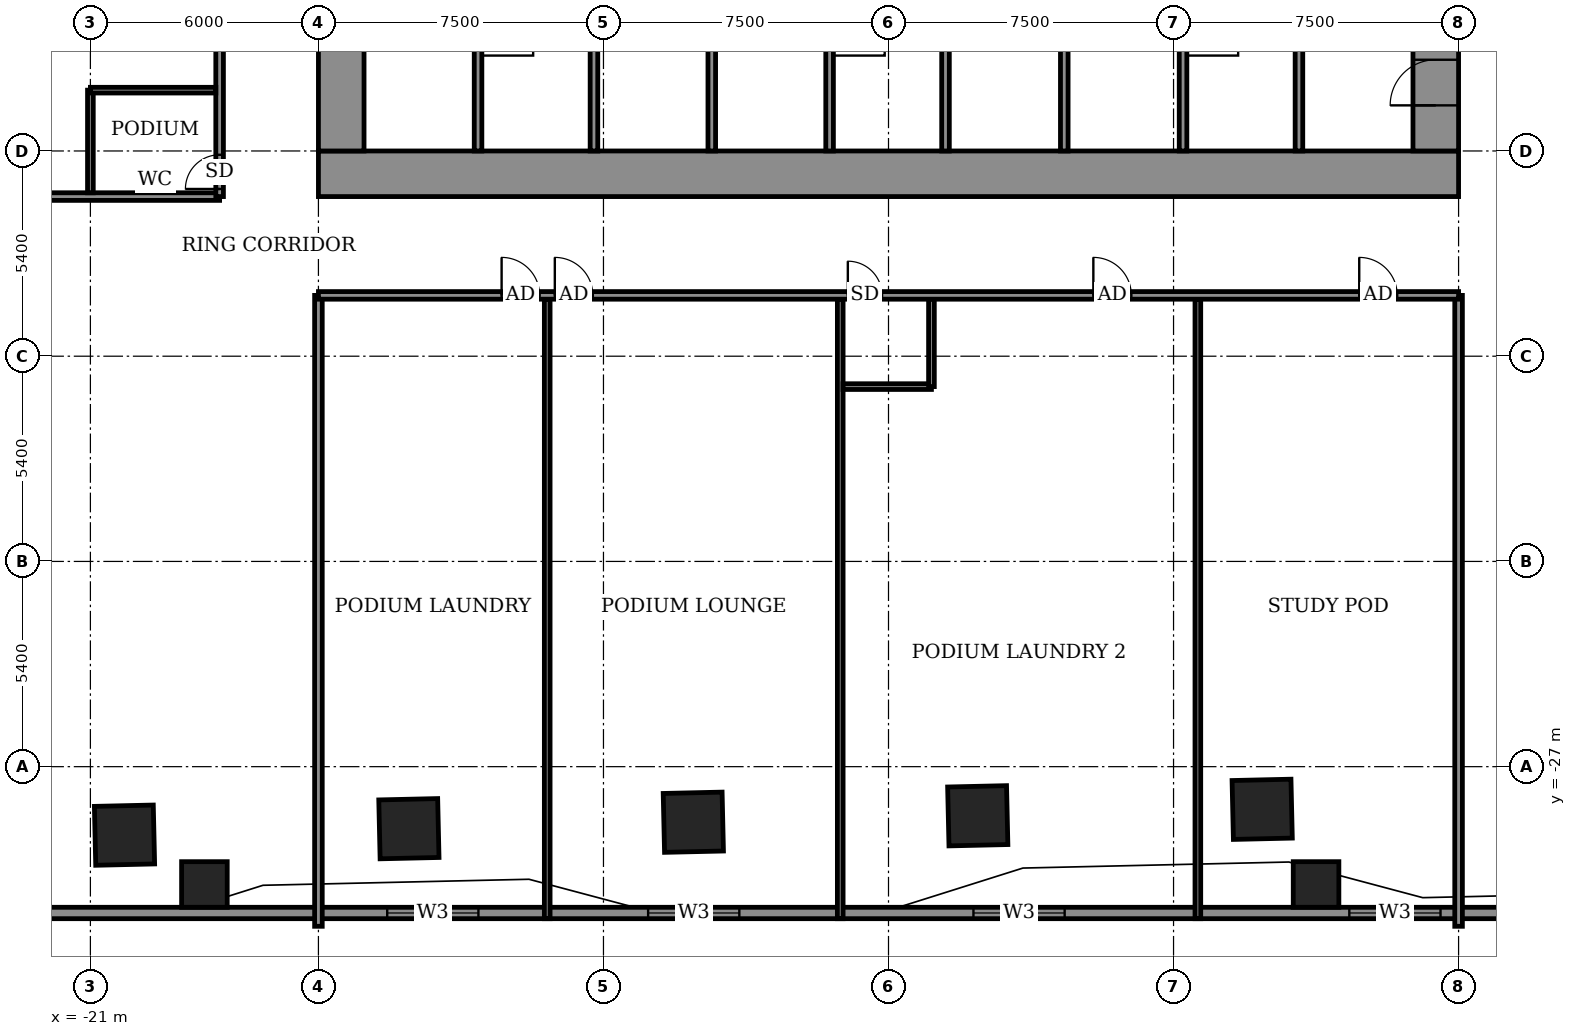
"""IFC4 building model, lengths in metres.
Left out: names, types, materials, properties, quantities, classifications, styles, units other than length and angle.
Written with IfcOpenShell. Run it as: python <this file> out.ifc"""

import sys

from ifc_helpers import new_model, si_unit, direction, frame, frame_2d, origin, origin_2d, place, context, subcontext, project, spatial, rectangle, extrude, element, fill, save


model = new_model("IFC4")
c1 = context("Model", 3, precision=1e-05, world=origin(), true_north=direction((0.0, 1.0)))
c2 = subcontext(c1, "Body", "Model", "MODEL_VIEW")
j1 = project(units=[si_unit("LENGTHUNIT", "METRE"), si_unit("PLANEANGLEUNIT", "RADIAN")], contexts=[c1])
p1 = place(None, origin())
s1 = spatial("IfcSite", under=j1, at=p1, CompositionType="ELEMENT")
p2 = place(p1, origin())
s2 = spatial("IfcBuilding", under=s1, at=p2, CompositionType="ELEMENT")
p3 = place(p2, frame((0.0, 0.0, 25.0)))
s3 = spatial("IfcBuildingStorey", under=s2, at=p3, CompositionType="ELEMENT", Elevation=25.0)
for number, where, z_axis, x_axis in (
    (1, (-20.103, -28.802, -0.55), (0.0, 0.0, 1.0), (1.0, 0.023, 0.0)),
    (2, (-12.62, -28.632, -0.55), (0.0, 0.0, 1.0), (1.0, 0.023, 0.0)),
    (3, (-5.135, -28.462, -0.55), (0.0, 0.0, 1.0), (1.0, 0.023, 0.0)),
    (4, (2.348, -28.292, -0.55), (0.0, 0.0, 1.0), (1.0, 0.023, 0.0)),
    (5, (9.833, -28.122, -0.55), (0.0, 0.0, 1.0), (1.0, 0.023, 0.0)),
):
    element("IfcColumn", number, at=place(p3, frame(where, z_axis=z_axis, x_axis=x_axis)), inside=s3, PredefinedType="COLUMN", context=c2, shape_type="SweptSolid", body=[
        extrude(rectangle(XDim=1.55, YDim=1.55, at=origin_2d()), origin(), (0.0, 0.0, 1.0), 4.5),
    ])
for number, where, z_axis, x_axis in (
    (6, (-18.0, -30.1, -0.55), (0.0, 0.0, 1.0), (1.0, 0.0, 0.0)),
    (7, (11.25, -30.1, -0.55), (0.0, 0.0, 1.0), (1.0, 0.0, 0.0)),
):
    element("IfcColumn", number, at=place(p3, frame(where, z_axis=z_axis, x_axis=x_axis)), inside=s3, PredefinedType="COLUMN", context=c2, shape_type="SweptSolid", body=[
        extrude(rectangle(XDim=1.2, YDim=1.2, at=origin_2d()), origin(), (0.0, 0.0, 1.0), 4.5),
    ])
p4 = place(p3, frame((-28.138, -30.85, 0.0), z_axis=(0.0, 0.0, 1.0), x_axis=(1.0, 0.0, 0.0)))
e8 = element("IfcWall", 8, at=p4, inside=s3, PredefinedType="SOLIDWALL", context=c2, shape_type="SweptSolid", body=[
    extrude(rectangle(XDim=56.276, YDim=0.3, at=frame_2d((28.138, 0.0))), origin(), (0.0, 0.0, 1.0), 3.95),
])
p5 = place(p4, frame((14.948, 0.0, 0.9)))
e9 = element("IfcOpeningElement", 9, at=p5, cuts=e8, PredefinedType="OPENING", context=c2, shape_type="SweptSolid", body=[
    extrude(rectangle(XDim=2.4, YDim=1.8, at=frame_2d((1.2, 0.9))), frame((0.0, 0.16, 0.0), z_axis=(0.0, -1.0, 0.0), x_axis=(1.0, 0.0, 0.0)), (0.0, 0.0, 1.0), 0.32),
])
p6 = place(p4, frame((21.813, 0.0, 0.9)))
e10 = element("IfcOpeningElement", 10, at=p6, cuts=e8, PredefinedType="OPENING", context=c2, shape_type="SweptSolid", body=[
    extrude(rectangle(XDim=2.4, YDim=1.8, at=frame_2d((1.2, 0.9))), frame((0.0, 0.16, 0.0), z_axis=(0.0, -1.0, 0.0), x_axis=(1.0, 0.0, 0.0)), (0.0, 0.0, 1.0), 0.32),
])
p7 = place(p4, frame((30.373, 0.0, 0.9)))
e11 = element("IfcOpeningElement", 11, at=p7, cuts=e8, PredefinedType="OPENING", context=c2, shape_type="SweptSolid", body=[
    extrude(rectangle(XDim=2.4, YDim=1.8, at=frame_2d((1.2, 0.9))), frame((0.0, 0.16, 0.0), z_axis=(0.0, -1.0, 0.0), x_axis=(1.0, 0.0, 0.0)), (0.0, 0.0, 1.0), 0.32),
])
p8 = place(p4, frame((40.263, 0.0, 0.9)))
e12 = element("IfcOpeningElement", 12, at=p8, cuts=e8, PredefinedType="OPENING", context=c2, shape_type="SweptSolid", body=[
    extrude(rectangle(XDim=2.4, YDim=1.8, at=frame_2d((1.2, 0.9))), frame((0.0, 0.16, 0.0), z_axis=(0.0, -1.0, 0.0), x_axis=(1.0, 0.0, 0.0)), (0.0, 0.0, 1.0), 0.32),
])
p9 = place(p4, frame((53.553, 0.0, 0.9)))
e13 = element("IfcOpeningElement", 13, at=p9, cuts=e8, PredefinedType="OPENING", context=c2, shape_type="SweptSolid", body=[
    extrude(rectangle(XDim=2.4, YDim=1.8, at=frame_2d((1.2, 0.9))), frame((0.0, 0.16, 0.0), z_axis=(0.0, -1.0, 0.0), x_axis=(1.0, 0.0, 0.0)), (0.0, 0.0, 1.0), 0.32),
])
p10 = place(p3, frame((-15.0, -31.2, 0.0), z_axis=(0.0, 0.0, 1.0), x_axis=(0.0, 1.0, 0.0)))
e14 = element("IfcWall", 14, at=p10, inside=s3, PredefinedType="PARTITIONING", context=c2, shape_type="SweptSolid", body=[
    extrude(rectangle(XDim=16.6, YDim=0.2, at=frame_2d((8.3, 0.0))), origin(), (0.0, 0.0, 1.0), 3.95),
])
for number, where, z_axis, x_axis in (
    (15, (-8.98, -31.0, 0.0), (0.0, 0.0, 1.0), (0.0, 1.0, 0.0)),
    (16, (-1.27, -31.0, 0.0), (0.0, 0.0, 1.0), (0.0, 1.0, 0.0)),
    (17, (8.14, -31.0, 0.0), (0.0, 0.0, 1.0), (0.0, 1.0, 0.0)),
):
    element("IfcWall", number, at=place(p3, frame(where, z_axis=z_axis, x_axis=x_axis)), inside=s3, PredefinedType="PARTITIONING", context=c2, shape_type="SweptSolid", body=[
        extrude(rectangle(XDim=16.3, YDim=0.15, at=frame_2d((8.15, 0.0))), origin(), (0.0, 0.0, 1.0), 3.95),
    ])
p11 = place(p3, frame((15.0, -31.2, 0.0), z_axis=(0.0, 0.0, 1.0), x_axis=(0.0, 1.0, 0.0)))
e18 = element("IfcWall", 18, at=p11, inside=s3, PredefinedType="PARTITIONING", context=c2, shape_type="SweptSolid", body=[
    extrude(rectangle(XDim=16.6, YDim=0.2, at=frame_2d((8.3, 0.0))), origin(), (0.0, 0.0, 1.0), 3.95),
])
p12 = place(p3, frame((-1.195, -17.0, 0.0), z_axis=(0.0, 0.0, 1.0), x_axis=(1.0, 0.0, 0.0)))
e19 = element("IfcWall", 19, at=p12, inside=s3, PredefinedType="PARTITIONING", context=c2, shape_type="SweptSolid", body=[
    extrude(rectangle(XDim=2.325, YDim=0.15, at=frame_2d((1.163, 0.0))), origin(), (0.0, 0.0, 1.0), 3.95),
])
p13 = place(p3, frame((1.13, -17.0, 0.0), z_axis=(0.0, 0.0, 1.0), x_axis=(0.0, 1.0, 0.0)))
e20 = element("IfcWall", 20, at=p13, inside=s3, PredefinedType="PARTITIONING", context=c2, shape_type="SweptSolid", body=[
    extrude(rectangle(XDim=2.3, YDim=0.15, at=frame_2d((1.15, 0.0))), origin(), (0.0, 0.0, 1.0), 3.95),
])
p14 = place(p3, frame((-15.0, -14.6, 0.0), z_axis=(0.0, 0.0, 1.0), x_axis=(1.0, 0.0, 0.0)))
e21 = element("IfcWall", 21, at=p14, inside=s3, PredefinedType="PARTITIONING", context=c2, shape_type="SweptSolid", body=[
    extrude(rectangle(XDim=30.0, YDim=0.2, at=frame_2d((15.0, 0.0))), origin(), (0.0, 0.0, 1.0), 3.95),
])
p15 = place(p14, frame((4.82, 0.0, 0.0)))
e22 = element("IfcOpeningElement", 22, at=p15, cuts=e21, PredefinedType="OPENING", context=c2, shape_type="SweptSolid", body=[
    extrude(rectangle(XDim=1.0, YDim=2.1, at=frame_2d((0.5, 1.05))), frame((0.0, 0.11, 0.0), z_axis=(0.0, -1.0, 0.0), x_axis=(1.0, 0.0, 0.0)), (0.0, 0.0, 1.0), 0.22),
])
p16 = place(p14, frame((6.22, 0.0, 0.0)))
e23 = element("IfcOpeningElement", 23, at=p16, cuts=e21, PredefinedType="OPENING", context=c2, shape_type="SweptSolid", body=[
    extrude(rectangle(XDim=1.0, YDim=2.1, at=frame_2d((0.5, 1.05))), frame((0.0, 0.11, 0.0), z_axis=(0.0, -1.0, 0.0), x_axis=(1.0, 0.0, 0.0)), (0.0, 0.0, 1.0), 0.22),
])
p17 = place(p14, frame((20.39, 0.0, 0.0)))
e24 = element("IfcOpeningElement", 24, at=p17, cuts=e21, PredefinedType="OPENING", context=c2, shape_type="SweptSolid", body=[
    extrude(rectangle(XDim=1.0, YDim=2.1, at=frame_2d((0.5, 1.05))), frame((0.0, 0.11, 0.0), z_axis=(0.0, -1.0, 0.0), x_axis=(1.0, 0.0, 0.0)), (0.0, 0.0, 1.0), 0.22),
])
p18 = place(p14, frame((13.93, 0.0, 0.0)))
e25 = element("IfcOpeningElement", 25, at=p18, cuts=e21, PredefinedType="OPENING", context=c2, shape_type="SweptSolid", body=[
    extrude(rectangle(XDim=0.9, YDim=2.1, at=frame_2d((0.45, 1.05))), frame((0.0, 0.11, 0.0), z_axis=(0.0, -1.0, 0.0), x_axis=(1.0, 0.0, 0.0)), (0.0, 0.0, 1.0), 0.22),
])
p19 = place(p14, frame((27.386, 0.0, 0.0)))
e26 = element("IfcOpeningElement", 26, at=p19, cuts=e21, PredefinedType="OPENING", context=c2, shape_type="SweptSolid", body=[
    extrude(rectangle(XDim=1.0, YDim=2.1, at=frame_2d((0.5, 1.05))), frame((0.0, 0.11, 0.0), z_axis=(0.0, -1.0, 0.0), x_axis=(1.0, 0.0, 0.0)), (0.0, 0.0, 1.0), 0.22),
])
p20 = place(p3, frame((-34.3, -12.0, 0.0), z_axis=(0.0, 0.0, 1.0), x_axis=(1.0, 0.0, 0.0)))
e27 = element("IfcWall", 27, at=p20, inside=s3, PredefinedType="PARTITIONING", context=c2, shape_type="SweptSolid", body=[
    extrude(rectangle(XDim=16.7, YDim=0.2, at=frame_2d((8.35, 0.0))), origin(), (0.0, 0.0, 1.0), 3.95),
])
p21 = place(p3, frame((-21.0, -11.9, 0.0), z_axis=(0.0, 0.0, 1.0), x_axis=(0.0, 1.0, 0.0)))
e28 = element("IfcWall", 28, at=p21, inside=s3, PredefinedType="PARTITIONING", context=c2, shape_type="SweptSolid", body=[
    extrude(rectangle(XDim=2.7, YDim=0.15, at=frame_2d((1.35, 0.0))), origin(), (0.0, 0.0, 1.0), 3.95),
])
p22 = place(p3, frame((-17.6, -12.0, 0.0), z_axis=(0.0, 0.0, 1.0), x_axis=(0.0, 1.0, 0.0)))
e29 = element("IfcWall", 29, at=p22, inside=s3, PredefinedType="PARTITIONING", context=c2, shape_type="SweptSolid", body=[
    extrude(rectangle(XDim=24.0, YDim=0.2, at=frame_2d((12.0, 0.0))), origin(), (0.0, 0.0, 1.0), 3.95),
])
p23 = place(p22, frame((9.58, 0.0, 0.0)))
e30 = element("IfcOpeningElement", 30, at=p23, cuts=e29, PredefinedType="OPENING", context=c2, shape_type="SweptSolid", body=[
    extrude(rectangle(XDim=1.0, YDim=2.1, at=frame_2d((0.5, 1.05))), frame((0.0, 0.11, 0.0), z_axis=(0.0, -1.0, 0.0), x_axis=(1.0, 0.0, 0.0)), (0.0, 0.0, 1.0), 0.22),
])
p24 = place(p22, frame((0.2, 0.0, 0.0)))
e31 = element("IfcOpeningElement", 31, at=p24, cuts=e29, PredefinedType="OPENING", context=c2, shape_type="SweptSolid", body=[
    extrude(rectangle(XDim=0.9, YDim=2.1, at=frame_2d((0.45, 1.05))), frame((0.0, 0.11, 0.0), z_axis=(0.0, -1.0, 0.0), x_axis=(1.0, 0.0, 0.0)), (0.0, 0.0, 1.0), 0.22),
])
p25 = place(p3, frame((-21.0, -9.2, 0.0), z_axis=(0.0, 0.0, 1.0), x_axis=(1.0, 0.0, 0.0)))
e32 = element("IfcWall", 32, at=p25, inside=s3, PredefinedType="PARTITIONING", context=c2, shape_type="SweptSolid", body=[
    extrude(rectangle(XDim=3.3, YDim=0.15, at=frame_2d((1.65, 0.0))), origin(), (0.0, 0.0, 1.0), 3.95),
])
p26 = place(p3, frame((-15.0, -11.4, 0.0), z_axis=(0.0, 0.0, 1.0), x_axis=(1.0, 0.0, 0.0)))
e33 = element("IfcWall", 33, at=p26, inside=s3, PredefinedType="SHEAR", context=c2, shape_type="SweptSolid", body=[
    extrude(rectangle(XDim=30.0, YDim=1.2, at=frame_2d((15.0, 0.0))), origin(), (0.0, 0.0, 1.0), 4.5),
])
p27 = place(p3, frame((-14.4, -10.8, 0.0), z_axis=(0.0, 0.0, 1.0), x_axis=(0.0, 1.0, 0.0)))
e34 = element("IfcWall", 34, at=p27, inside=s3, PredefinedType="SHEAR", context=c2, shape_type="SweptSolid", body=[
    extrude(rectangle(XDim=21.6, YDim=1.2, at=frame_2d((10.8, 0.0))), origin(), (0.0, 0.0, 1.0), 4.5),
])
p28 = place(p27, frame((8.25, 0.0, 0.0)))
e35 = element("IfcOpeningElement", 35, at=p28, cuts=e34, PredefinedType="OPENING", context=c2, shape_type="SweptSolid", body=[
    extrude(rectangle(XDim=1.2, YDim=2.1, at=frame_2d((0.6, 1.05))), frame((0.0, 0.61, 0.0), z_axis=(0.0, -1.0, 0.0), x_axis=(1.0, 0.0, 0.0)), (0.0, 0.0, 1.0), 1.22),
])
p29 = place(p27, frame((15.25, 0.0, 0.0)))
e36 = element("IfcOpeningElement", 36, at=p29, cuts=e34, PredefinedType="OPENING", context=c2, shape_type="SweptSolid", body=[
    extrude(rectangle(XDim=1.2, YDim=2.1, at=frame_2d((0.6, 1.05))), frame((0.0, 0.61, 0.0), z_axis=(0.0, -1.0, 0.0), x_axis=(1.0, 0.0, 0.0)), (0.0, 0.0, 1.0), 1.22),
])
p30 = place(p3, frame((14.4, -10.8, 0.0), z_axis=(0.0, 0.0, 1.0), x_axis=(0.0, 1.0, 0.0)))
e37 = element("IfcWall", 37, at=p30, inside=s3, PredefinedType="SHEAR", context=c2, shape_type="SweptSolid", body=[
    extrude(rectangle(XDim=21.6, YDim=1.2, at=frame_2d((10.8, 0.0))), origin(), (0.0, 0.0, 1.0), 4.5),
])
p31 = place(p30, frame((1.2, 0.0, 0.0)))
e38 = element("IfcOpeningElement", 38, at=p31, cuts=e37, PredefinedType="OPENING", context=c2, shape_type="SweptSolid", body=[
    extrude(rectangle(XDim=1.2, YDim=2.1, at=frame_2d((0.6, 1.05))), frame((0.0, 0.61, 0.0), z_axis=(0.0, -1.0, 0.0), x_axis=(1.0, 0.0, 0.0)), (0.0, 0.0, 1.0), 1.22),
])
for number, where, z_axis, x_axis in (
    (39, (-10.8, -10.8, 0.0), (0.0, 0.0, 1.0), (0.0, 1.0, 0.0)),
    (40, (-7.75, -10.8, 0.0), (0.0, 0.0, 1.0), (0.0, 1.0, 0.0)),
):
    element("IfcWall", number, at=place(p3, frame(where, z_axis=z_axis, x_axis=x_axis)), inside=s3, PredefinedType="SHEAR", context=c2, shape_type="SweptSolid", body=[
        extrude(rectangle(XDim=7.5, YDim=0.2, at=frame_2d((3.75, 0.0))), origin(), (0.0, 0.0, 1.0), 3.95),
    ])
p32 = place(p3, frame((-1.55, -10.8, 0.0), z_axis=(0.0, 0.0, 1.0), x_axis=(0.0, 1.0, 0.0)))
e41 = element("IfcWall", 41, at=p32, inside=s3, PredefinedType="SHEAR", context=c2, shape_type="SweptSolid", body=[
    extrude(rectangle(XDim=7.5, YDim=0.2, at=frame_2d((3.75, 0.0))), origin(), (0.0, 0.0, 1.0), 3.95),
])
p33 = place(p32, frame((6.3, 0.0, 0.0)))
e42 = element("IfcOpeningElement", 42, at=p33, cuts=e41, PredefinedType="OPENING", context=c2, shape_type="SweptSolid", body=[
    extrude(rectangle(XDim=1.0, YDim=2.1, at=frame_2d((0.5, 1.05))), frame((0.0, 0.11, 0.0), z_axis=(0.0, -1.0, 0.0), x_axis=(1.0, 0.0, 0.0)), (0.0, 0.0, 1.0), 0.22),
])
p34 = place(p3, frame((1.5, -10.8, 0.0), z_axis=(0.0, 0.0, 1.0), x_axis=(0.0, 1.0, 0.0)))
e43 = element("IfcWall", 43, at=p34, inside=s3, PredefinedType="SHEAR", context=c2, shape_type="SweptSolid", body=[
    extrude(rectangle(XDim=7.5, YDim=0.2, at=frame_2d((3.75, 0.0))), origin(), (0.0, 0.0, 1.0), 3.95),
])
p35 = place(p34, frame((6.3, 0.0, 0.0)))
e44 = element("IfcOpeningElement", 44, at=p35, cuts=e43, PredefinedType="OPENING", context=c2, shape_type="SweptSolid", body=[
    extrude(rectangle(XDim=1.0, YDim=2.1, at=frame_2d((0.5, 1.05))), frame((0.0, 0.11, 0.0), z_axis=(0.0, -1.0, 0.0), x_axis=(1.0, 0.0, 0.0)), (0.0, 0.0, 1.0), 0.22),
])
p36 = place(p3, frame((7.75, -10.8, 0.0), z_axis=(0.0, 0.0, 1.0), x_axis=(0.0, 1.0, 0.0)))
e45 = element("IfcWall", 45, at=p36, inside=s3, PredefinedType="SHEAR", context=c2, shape_type="SweptSolid", body=[
    extrude(rectangle(XDim=7.5, YDim=0.2, at=frame_2d((3.75, 0.0))), origin(), (0.0, 0.0, 1.0), 3.95),
])
p37 = place(p36, frame((6.3, 0.0, 0.0)))
e46 = element("IfcOpeningElement", 46, at=p37, cuts=e45, PredefinedType="OPENING", context=c2, shape_type="SweptSolid", body=[
    extrude(rectangle(XDim=1.0, YDim=2.1, at=frame_2d((0.5, 1.05))), frame((0.0, 0.11, 0.0), z_axis=(0.0, -1.0, 0.0), x_axis=(1.0, 0.0, 0.0)), (0.0, 0.0, 1.0), 0.22),
])
p38 = place(p3, frame((10.8, -10.8, 0.0), z_axis=(0.0, 0.0, 1.0), x_axis=(0.0, 1.0, 0.0)))
e47 = element("IfcWall", 47, at=p38, inside=s3, PredefinedType="SHEAR", context=c2, shape_type="SweptSolid", body=[
    extrude(rectangle(XDim=7.5, YDim=0.2, at=frame_2d((3.75, 0.0))), origin(), (0.0, 0.0, 1.0), 3.95),
])
for number, where, z_axis, x_axis in (
    (48, (-4.65, -10.8, 0.0), (0.0, 0.0, 1.0), (0.0, 1.0, 0.0)),
    (49, (4.625, -10.8, 0.0), (0.0, 0.0, 1.0), (0.0, 1.0, 0.0)),
):
    element("IfcWall", number, at=place(p3, frame(where, z_axis=z_axis, x_axis=x_axis)), inside=s3, PredefinedType="SHEAR", context=c2, shape_type="SweptSolid", body=[
        extrude(rectangle(XDim=2.7, YDim=0.2, at=frame_2d((1.35, 0.0))), origin(), (0.0, 0.0, 1.0), 3.95),
    ])
p39 = place(p5, origin())
e50 = element("IfcWindow", 50, at=p39, inside=s3, PartitioningType="DOUBLE_PANEL_VERTICAL", PredefinedType="WINDOW", context=c2, shape_type="SweptSolid", body=[
    extrude(rectangle(XDim=2.4, YDim=1.8, at=frame_2d((1.2, 0.9))), frame((0.0, 0.03, 0.0), z_axis=(0.0, -1.0, 0.0), x_axis=(1.0, 0.0, 0.0)), (0.0, 0.0, 1.0), 0.06),
])
fill(e9, e50)
p40 = place(p6, origin())
e51 = element("IfcWindow", 51, at=p40, inside=s3, PartitioningType="DOUBLE_PANEL_VERTICAL", PredefinedType="WINDOW", context=c2, shape_type="SweptSolid", body=[
    extrude(rectangle(XDim=2.4, YDim=1.8, at=frame_2d((1.2, 0.9))), frame((0.0, 0.03, 0.0), z_axis=(0.0, -1.0, 0.0), x_axis=(1.0, 0.0, 0.0)), (0.0, 0.0, 1.0), 0.06),
])
fill(e10, e51)
p41 = place(p7, origin())
e52 = element("IfcWindow", 52, at=p41, inside=s3, PartitioningType="DOUBLE_PANEL_VERTICAL", PredefinedType="WINDOW", context=c2, shape_type="SweptSolid", body=[
    extrude(rectangle(XDim=2.4, YDim=1.8, at=frame_2d((1.2, 0.9))), frame((0.0, 0.03, 0.0), z_axis=(0.0, -1.0, 0.0), x_axis=(1.0, 0.0, 0.0)), (0.0, 0.0, 1.0), 0.06),
])
fill(e11, e52)
p42 = place(p8, origin())
e53 = element("IfcWindow", 53, at=p42, inside=s3, PartitioningType="DOUBLE_PANEL_VERTICAL", PredefinedType="WINDOW", context=c2, shape_type="SweptSolid", body=[
    extrude(rectangle(XDim=2.4, YDim=1.8, at=frame_2d((1.2, 0.9))), frame((0.0, 0.03, 0.0), z_axis=(0.0, -1.0, 0.0), x_axis=(1.0, 0.0, 0.0)), (0.0, 0.0, 1.0), 0.06),
])
fill(e12, e53)
p43 = place(p15, origin())
e54 = element("IfcDoor", 54, at=p43, inside=s3, OperationType="SINGLE_SWING_LEFT", PredefinedType="DOOR", context=c2, shape_type="SweptSolid", body=[
    extrude(rectangle(XDim=1.0, YDim=2.1, at=frame_2d((0.5, 1.05))), frame((0.0, 0.025, 0.0), z_axis=(0.0, -1.0, 0.0), x_axis=(1.0, 0.0, 0.0)), (0.0, 0.0, 1.0), 0.05),
])
fill(e22, e54)
p44 = place(p16, origin())
e55 = element("IfcDoor", 55, at=p44, inside=s3, OperationType="SINGLE_SWING_RIGHT", PredefinedType="DOOR", context=c2, shape_type="SweptSolid", body=[
    extrude(rectangle(XDim=1.0, YDim=2.1, at=frame_2d((0.5, 1.05))), frame((0.0, 0.025, 0.0), z_axis=(0.0, -1.0, 0.0), x_axis=(1.0, 0.0, 0.0)), (0.0, 0.0, 1.0), 0.05),
])
fill(e23, e55)
p45 = place(p17, origin())
e56 = element("IfcDoor", 56, at=p45, inside=s3, OperationType="SINGLE_SWING_LEFT", PredefinedType="DOOR", context=c2, shape_type="SweptSolid", body=[
    extrude(rectangle(XDim=1.0, YDim=2.1, at=frame_2d((0.5, 1.05))), frame((0.0, 0.025, 0.0), z_axis=(0.0, -1.0, 0.0), x_axis=(1.0, 0.0, 0.0)), (0.0, 0.0, 1.0), 0.05),
])
fill(e24, e56)
p46 = place(p18, origin())
e57 = element("IfcDoor", 57, at=p46, inside=s3, OperationType="SINGLE_SWING_LEFT", PredefinedType="DOOR", context=c2, shape_type="SweptSolid", body=[
    extrude(rectangle(XDim=0.9, YDim=2.1, at=frame_2d((0.45, 1.05))), frame((0.0, 0.025, 0.0), z_axis=(0.0, -1.0, 0.0), x_axis=(1.0, 0.0, 0.0)), (0.0, 0.0, 1.0), 0.05),
])
fill(e25, e57)
p47 = place(p19, origin())
e58 = element("IfcDoor", 58, at=p47, inside=s3, OperationType="SINGLE_SWING_RIGHT", PredefinedType="DOOR", context=c2, shape_type="SweptSolid", body=[
    extrude(rectangle(XDim=1.0, YDim=2.1, at=frame_2d((0.5, 1.05))), frame((0.0, 0.025, 0.0), z_axis=(0.0, -1.0, 0.0), x_axis=(1.0, 0.0, 0.0)), (0.0, 0.0, 1.0), 0.05),
])
fill(e26, e58)
p48 = place(p24, origin())
e59 = element("IfcDoor", 59, at=p48, inside=s3, OperationType="SINGLE_SWING_RIGHT", PredefinedType="DOOR", context=c2, shape_type="SweptSolid", body=[
    extrude(rectangle(XDim=0.9, YDim=2.1, at=frame_2d((0.45, 1.05))), frame((0.0, 0.025, 0.0), z_axis=(0.0, -1.0, 0.0), x_axis=(1.0, 0.0, 0.0)), (0.0, 0.0, 1.0), 0.05),
])
fill(e31, e59)
p49 = place(p31, origin())
e60 = element("IfcDoor", 60, at=p49, inside=s3, OperationType="DOUBLE_DOOR_SINGLE_SWING", PredefinedType="DOOR", context=c2, shape_type="SweptSolid", body=[
    extrude(rectangle(XDim=1.2, YDim=2.1, at=frame_2d((0.6, 1.05))), frame((0.0, 0.025, 0.0), z_axis=(0.0, -1.0, 0.0), x_axis=(1.0, 0.0, 0.0)), (0.0, 0.0, 1.0), 0.05),
])
fill(e38, e60)
save(model, sys.argv[1])
